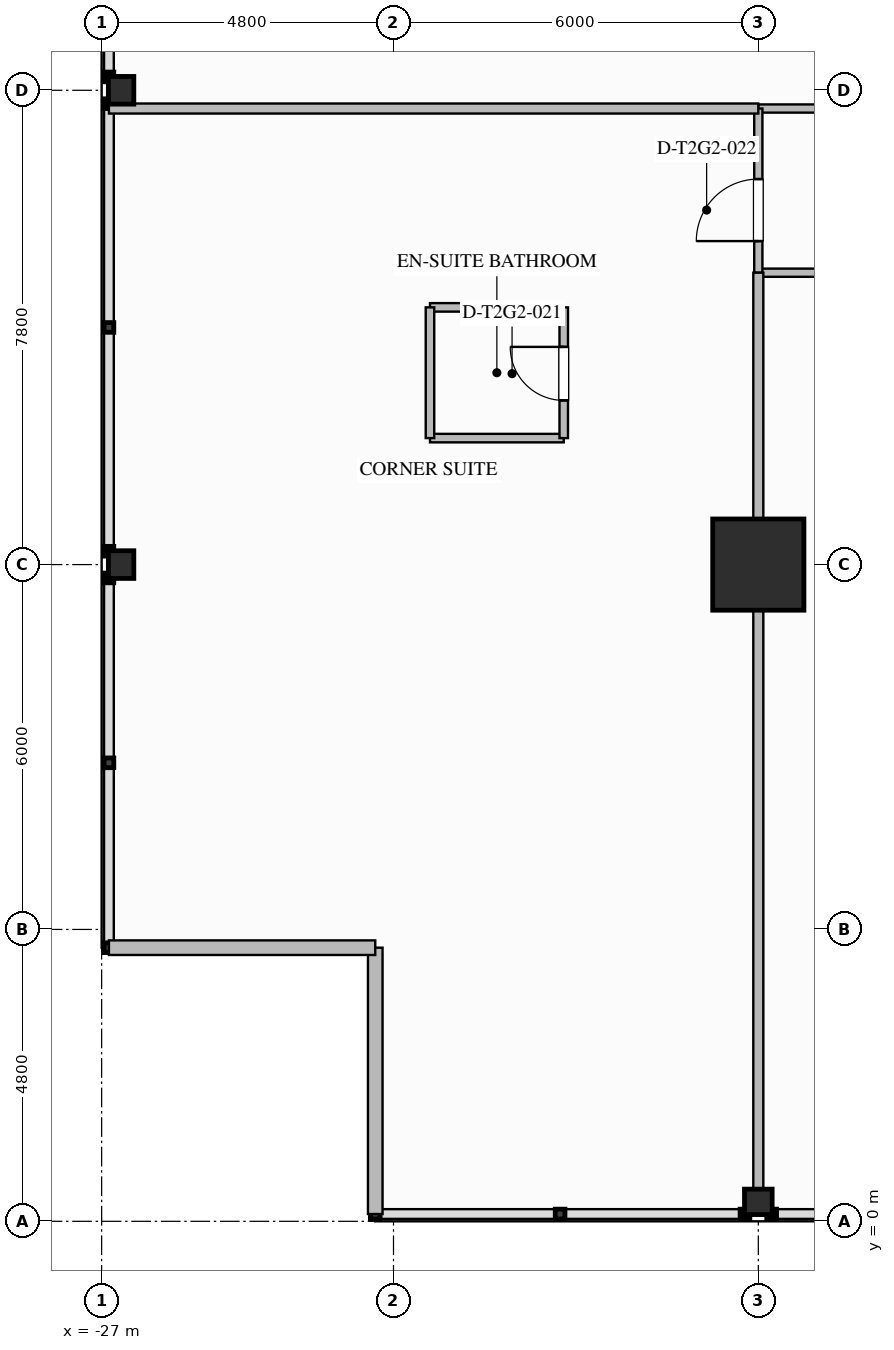
"""IFC4 building model, lengths in metres.
Left out: names, types, materials, properties, quantities, classifications, styles, units other than length and angle.
Written with IfcOpenShell. Run it as: python <this file> out.ifc"""

import sys

from ifc_helpers import new_model, si_unit, direction, frame, frame_2d, origin, origin_2d, place, context, subcontext, project, spatial, rectangle, i_section, extrude, element, fill, save


model = new_model("IFC4")
c1 = context("Model", 3, precision=1e-05, world=origin(), true_north=direction((0.0, 1.0)))
c2 = subcontext(c1, "Body", "Model", "MODEL_VIEW")
j1 = project(units=[si_unit("LENGTHUNIT", "METRE"), si_unit("PLANEANGLEUNIT", "RADIAN")], contexts=[c1])
p1 = place(None, origin())
s1 = spatial("IfcSite", under=j1, at=p1, CompositionType="ELEMENT")
p2 = place(p1, origin())
s2 = spatial("IfcBuilding", under=s1, at=p2, CompositionType="ELEMENT")
p3 = place(p2, frame((0.0, 0.0, 102.3)))
s3 = spatial("IfcBuildingStorey", under=s2, at=p3, CompositionType="ELEMENT", Elevation=102.3)
p4 = place(p3, frame((-16.2, 10.8, 0.0), z_axis=(0.0, 0.0, 1.0), x_axis=(1.0, 0.0, 0.0)))
e1 = element("IfcColumn", 1, at=p4, inside=s3, PredefinedType="COLUMN", context=c2, shape_type="SweptSolid", body=[
    extrude(rectangle(XDim=1.5, YDim=1.5, at=origin_2d()), origin(), (0.0, 0.0, 1.0), 3.5),
])
for number, where, z_axis, x_axis in (
    (2, (-26.68, 10.8, 0.0), (0.0, 0.0, 1.0), (1.0, 0.0, 0.0)),
    (3, (-26.68, 18.6, 0.0), (0.0, 0.0, 1.0), (1.0, 0.0, 0.0)),
    (4, (-16.2, 0.32, 0.0), (0.0, 0.0, 1.0), (0.0, 1.0, 0.0)),
):
    element("IfcColumn", number, at=place(p3, frame(where, z_axis=z_axis, x_axis=x_axis)), inside=s3, PredefinedType="COLUMN", context=c2, shape_type="SweptSolid", body=[
        extrude(i_section(OverallWidth=0.418, OverallDepth=0.455, WebThickness=0.042, FlangeThickness=0.068, FilletRadius=0.03, at=origin_2d()), origin(), (0.0, 0.0, 1.0), 3.497),
    ])
for number, where, z_axis, x_axis in (
    (5, (-22.5, 0.12, 0.0), (0.0, 0.0, 1.0), (0.0, 1.0, 0.0)),
    (6, (-22.5, 4.5, 0.0), (0.0, 0.0, 1.0), (-1.0, 0.0, 0.0)),
):
    element("IfcWall", number, at=place(p3, frame(where, z_axis=z_axis, x_axis=x_axis)), inside=s3, PredefinedType="STANDARD", context=c2, shape_type="SweptSolid", body=[
        extrude(rectangle(XDim=4.38, YDim=0.24, at=frame_2d((2.19, 0.0))), origin(), (0.0, 0.0, 1.0), 3.24),
    ])
p5 = place(p3, frame((-16.2, 18.3, 0.0), z_axis=(0.0, 0.0, 1.0), x_axis=(1.0, 0.0, 0.0)))
e7 = element("IfcWall", 7, at=p5, inside=s3, PredefinedType="PARTITIONING", context=c2, shape_type="SweptSolid", body=[
    extrude(rectangle(XDim=5.4, YDim=0.135, at=frame_2d((2.7, 0.0))), origin(), (0.0, 0.0, 1.0), 3.24),
])
p6 = place(p3, frame((-16.2, 15.6, 0.0), z_axis=(0.0, 0.0, 1.0), x_axis=(1.0, 0.0, 0.0)))
e8 = element("IfcWall", 8, at=p6, inside=s3, PredefinedType="PARTITIONING", context=c2, shape_type="SweptSolid", body=[
    extrude(rectangle(XDim=24.9, YDim=0.135, at=frame_2d((12.45, 0.0))), origin(), (0.0, 0.0, 1.0), 3.24),
])
p7 = place(p6, frame((5.21, 0.0, 0.0)))
e9 = element("IfcOpeningElement", 9, at=p7, cuts=e8, PredefinedType="OPENING", context=c2, shape_type="SweptSolid", body=[
    extrude(rectangle(XDim=1.26, YDim=2.2, at=frame_2d((0.63, 1.1))), frame((0.0, 0.077, 0.0), z_axis=(0.0, -1.0, 0.0), x_axis=(1.0, 0.0, 0.0)), (0.0, 0.0, 1.0), 0.155),
])
p8 = place(p6, frame((18.995, 0.0, 0.0)))
e10 = element("IfcOpeningElement", 10, at=p8, cuts=e8, PredefinedType="OPENING", context=c2, shape_type="SweptSolid", body=[
    extrude(rectangle(XDim=1.02, YDim=2.15, at=frame_2d((0.51, 1.075))), frame((0.0, 0.077, 0.0), z_axis=(0.0, -1.0, 0.0), x_axis=(1.0, 0.0, 0.0)), (0.0, 0.0, 1.0), 0.155),
])
p9 = place(p3, frame((-16.2, 15.6, 0.0), z_axis=(0.0, 0.0, 1.0), x_axis=(0.0, 1.0, 0.0)))
e11 = element("IfcWall", 11, at=p9, inside=s3, PredefinedType="PARTITIONING", context=c2, shape_type="SweptSolid", body=[
    extrude(rectangle(XDim=2.7, YDim=0.135, at=frame_2d((1.35, 0.0))), origin(), (0.0, 0.0, 1.0), 2.452),
])
p10 = place(p9, frame((0.52, 0.0, 0.0)))
e12 = element("IfcOpeningElement", 12, at=p10, cuts=e11, PredefinedType="OPENING", context=c2, shape_type="SweptSolid", body=[
    extrude(rectangle(XDim=1.02, YDim=2.15, at=frame_2d((0.51, 1.075))), frame((0.0, 0.077, 0.0), z_axis=(0.0, -1.0, 0.0), x_axis=(1.0, 0.0, 0.0)), (0.0, 0.0, 1.0), 0.155),
])
p11 = place(p3, frame((-16.2, 0.12, 0.0), z_axis=(0.0, 0.0, 1.0), x_axis=(0.0, 1.0, 0.0)))
e13 = element("IfcWall", 13, at=p11, inside=s3, PredefinedType="PARTITIONING", context=c2, shape_type="SweptSolid", body=[
    extrude(rectangle(XDim=15.48, YDim=0.165, at=frame_2d((7.74, 0.0))), origin(), (0.0, 0.0, 1.0), 2.452),
])
p12 = place(p3, frame((-26.88, 18.3, 0.0), z_axis=(0.0, 0.0, 1.0), x_axis=(1.0, 0.0, 0.0)))
e14 = element("IfcWall", 14, at=p12, inside=s3, PredefinedType="PARTITIONING", context=c2, shape_type="SweptSolid", body=[
    extrude(rectangle(XDim=10.68, YDim=0.165, at=frame_2d((5.34, 0.0))), origin(), (0.0, 0.0, 1.0), 2.452),
])
for number, where, z_axis, x_axis in (
    (15, (-21.6, 12.88, 0.0), (0.0, 0.0, 1.0), (1.0, 0.0, 0.0)),
    (16, (-21.6, 15.03, 0.0), (0.0, 0.0, 1.0), (1.0, 0.0, 0.0)),
):
    element("IfcWall", number, at=place(p3, frame(where, z_axis=z_axis, x_axis=x_axis)), inside=s3, PredefinedType="PLUMBINGWALL", context=c2, shape_type="SweptSolid", body=[
        extrude(rectangle(XDim=2.2, YDim=0.14, at=frame_2d((1.1, 0.0))), origin(), (0.0, 0.0, 1.0), 3.24),
    ])
p13 = place(p3, frame((-21.6, 12.88, 0.0), z_axis=(0.0, 0.0, 1.0), x_axis=(0.0, 1.0, 0.0)))
e17 = element("IfcWall", 17, at=p13, inside=s3, PredefinedType="PLUMBINGWALL", context=c2, shape_type="SweptSolid", body=[
    extrude(rectangle(XDim=2.15, YDim=0.14, at=frame_2d((1.075, 0.0))), origin(), (0.0, 0.0, 1.0), 3.24),
])
p14 = place(p3, frame((-19.4, 12.88, 0.0), z_axis=(0.0, 0.0, 1.0), x_axis=(0.0, 1.0, 0.0)))
e18 = element("IfcWall", 18, at=p14, inside=s3, PredefinedType="PLUMBINGWALL", context=c2, shape_type="SweptSolid", body=[
    extrude(rectangle(XDim=2.15, YDim=0.14, at=frame_2d((1.075, 0.0))), origin(), (0.0, 0.0, 1.0), 3.24),
])
p15 = place(p14, frame((0.62, 0.0, 0.0)))
e19 = element("IfcOpeningElement", 19, at=p15, cuts=e18, PredefinedType="OPENING", context=c2, shape_type="SweptSolid", body=[
    extrude(rectangle(XDim=0.88, YDim=2.1, at=frame_2d((0.44, 1.05))), frame((0.0, 0.08, 0.0), z_axis=(0.0, -1.0, 0.0), x_axis=(1.0, 0.0, 0.0)), (0.0, 0.0, 1.0), 0.16),
])
p16 = place(p15, origin())
e20 = element("IfcDoor", 20, at=p16, inside=s3, OperationType="SINGLE_SWING_RIGHT", PredefinedType="DOOR", context=c2, shape_type="SweptSolid", body=[
    extrude(rectangle(XDim=0.88, YDim=2.1, at=frame_2d((0.44, 1.05))), frame((0.0, 0.025, 0.0), z_axis=(0.0, -1.0, 0.0), x_axis=(1.0, 0.0, 0.0)), (0.0, 0.0, 1.0), 0.05),
])
fill(e19, e20)
p17 = place(p10, origin())
e21 = element("IfcDoor", 21, at=p17, inside=s3, OperationType="SINGLE_SWING_LEFT", PredefinedType="DOOR", context=c2, shape_type="SweptSolid", body=[
    extrude(rectangle(XDim=1.02, YDim=2.15, at=frame_2d((0.51, 1.075))), frame((0.0, 0.025, 0.0), z_axis=(0.0, -1.0, 0.0), x_axis=(1.0, 0.0, 0.0)), (0.0, 0.0, 1.0), 0.05),
])
fill(e12, e21)
save(model, sys.argv[1])
